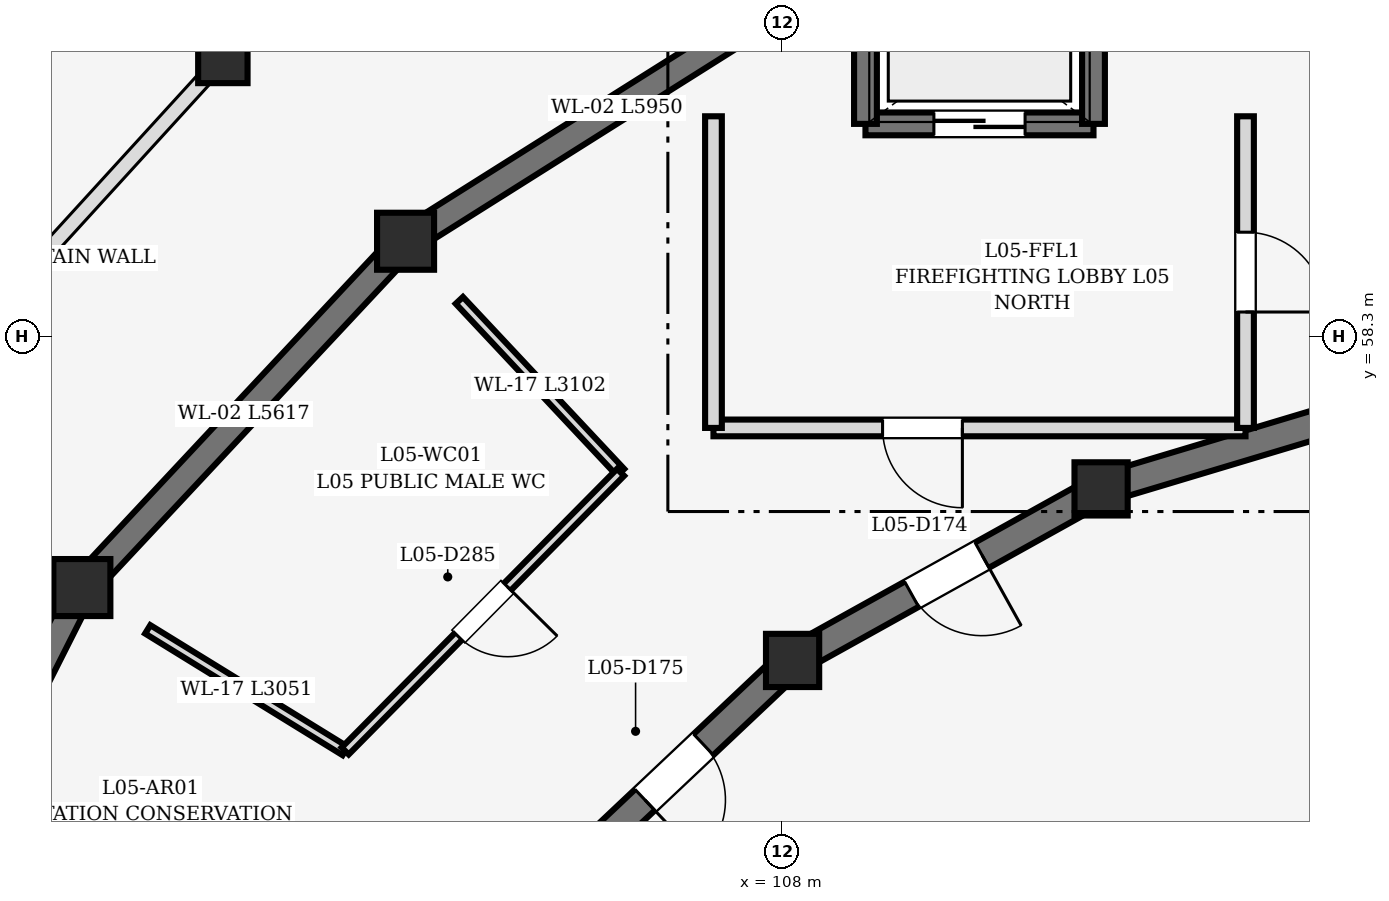
"""IFC4 building model, lengths in metres.
Left out: names, types, materials, properties, quantities, classifications, styles, units other than length and angle.
Written with IfcOpenShell. Run it as: python <this file> out.ifc"""

import sys

from ifc_helpers import new_model, si_unit, direction, frame, frame_2d, origin, origin_2d, place, context, subcontext, project, spatial, rectangle, circle, extrude, element, fill, save


model = new_model("IFC4")
c1 = context("Model", 3, precision=1e-05, world=origin(), true_north=direction((0.0, 1.0)))
c2 = subcontext(c1, "Body", "Model", "MODEL_VIEW")
j1 = project(units=[si_unit("LENGTHUNIT", "METRE"), si_unit("PLANEANGLEUNIT", "RADIAN")], contexts=[c1])
p1 = place(None, origin())
s1 = spatial("IfcSite", under=j1, at=p1, CompositionType="ELEMENT")
p2 = place(p1, origin())
s2 = spatial("IfcBuilding", under=s1, at=p2, CompositionType="ELEMENT")
p3 = place(p2, frame((0.0, 0.0, 19.2)))
s3 = spatial("IfcBuildingStorey", under=s2, at=p3, CompositionType="ELEMENT", Elevation=19.2)
for number, where, z_axis, x_axis in (
    (1, (112.2, 56.298, 0.0), (0.0, 0.0, 1.0), (1.0, 0.0, 0.0)),
    (2, (108.141, 54.041, 0.0), (0.0, 0.0, 1.0), (1.0, 0.0, 0.0)),
):
    element("IfcColumn", number, at=place(p3, frame(where, z_axis=z_axis, x_axis=x_axis)), inside=s3, PredefinedType="COLUMN", context=c2, shape_type="SweptSolid", body=[
        extrude(rectangle(XDim=0.7, YDim=0.7, at=origin_2d()), origin(), (0.0, 0.0, 1.0), 4.5),
    ])
p4 = place(p3, frame((103.049, 59.556, 0.0), z_axis=(0.0, 0.0, 1.0), x_axis=(1.0, 0.0, 0.0)))
e3 = element("IfcColumn", 3, at=p4, inside=s3, PredefinedType="COLUMN", context=c2, shape_type="SweptSolid", body=[
    extrude(circle(Radius=0.375, at=origin_2d()), origin(), (0.0, 0.0, 1.0), 4.5),
])
p5 = place(p3, frame((100.645, 61.961, 0.0), z_axis=(0.0, 0.0, 1.0), x_axis=(1.0, 0.0, 0.0)))
e4 = element("IfcColumn", 4, at=p5, inside=s3, PredefinedType="COLUMN", context=c2, shape_type="SweptSolid", body=[
    extrude(circle(Radius=0.325, at=origin_2d()), origin(), (0.0, 0.0, 1.0), 4.5),
])
p6 = place(p3, frame((98.79, 55.0, 0.0), z_axis=(0.0, 0.0, 1.0), x_axis=(1.0, 0.0, 0.0)))
e5 = element("IfcColumn", 5, at=p6, inside=s3, PredefinedType="COLUMN", context=c2, shape_type="SweptSolid", body=[
    extrude(circle(Radius=0.375, at=origin_2d()), origin(), (0.0, 0.0, 1.0), 4.5),
])
p7 = place(p3, frame((116.654, 57.634, 0.0), z_axis=(0.0, 0.0, 1.0), x_axis=(-0.957792414988, -0.287460762177, 0.0)))
e6 = element("IfcWall", 6, at=p7, inside=s3, PredefinedType="SOLIDWALL", context=c2, shape_type="SweptSolid", body=[
    extrude(rectangle(XDim=4.365, YDim=0.38, at=frame_2d((2.183, 0.0))), origin(), (0.0, 0.0, 1.0), 4.25),
])
p8 = place(p3, frame((111.951, 56.159, 0.0), z_axis=(0.0, 0.0, 1.0), x_axis=(-0.87401308715, -0.485902380618, 0.0)))
e7 = element("IfcWall", 7, at=p8, inside=s3, PredefinedType="SOLIDWALL", context=c2, shape_type="SweptSolid", body=[
    extrude(rectangle(XDim=4.074, YDim=0.38, at=frame_2d((2.037, 0.0))), origin(), (0.0, 0.0, 1.0), 4.25),
])
p9 = place(p8, frame((1.507, 0.0, 0.0)))
e8 = element("IfcOpeningElement", 8, at=p9, cuts=e7, PredefinedType="OPENING", context=c2, shape_type="SweptSolid", body=[
    extrude(rectangle(XDim=1.06, YDim=2.24, at=frame_2d((0.53, 1.12))), frame((0.0, 0.202, 0.0), z_axis=(0.0, -1.0, 0.0), x_axis=(1.0, 0.0, 0.0)), (0.0, 0.0, 1.0), 0.404),
])
p10 = place(p3, frame((108.346, 62.893, 0.0), z_axis=(0.0, 0.0, 1.0), x_axis=(-0.846132783073, -0.532972150688, 0.0)))
e9 = element("IfcWall", 9, at=p10, inside=s3, PredefinedType="SHEAR", context=c2, shape_type="SweptSolid", body=[
    extrude(rectangle(XDim=5.95, YDim=0.35, at=frame_2d((2.975, 0.0))), origin(), (0.0, 0.0, 1.0), 4.23),
])
p11 = place(p3, frame((107.934, 53.845, 0.0), z_axis=(0.0, 0.0, 1.0), x_axis=(-0.727127996206, -0.686501913423, 0.0)))
e10 = element("IfcWall", 10, at=p11, inside=s3, PredefinedType="SOLIDWALL", context=c2, shape_type="SweptSolid", body=[
    extrude(rectangle(XDim=3.714, YDim=0.38, at=frame_2d((1.857, 0.0))), origin(), (0.0, 0.0, 1.0), 4.25),
])
p12 = place(p11, frame((1.327, 0.0, 0.0)))
e11 = element("IfcOpeningElement", 11, at=p12, cuts=e10, PredefinedType="OPENING", context=c2, shape_type="SweptSolid", body=[
    extrude(rectangle(XDim=1.06, YDim=2.24, at=frame_2d((0.53, 1.12))), frame((0.0, 0.202, 0.0), z_axis=(0.0, -1.0, 0.0), x_axis=(1.0, 0.0, 0.0)), (0.0, 0.0, 1.0), 0.404),
])
p13 = place(p3, frame((102.838, 59.33, 0.0), z_axis=(0.0, 0.0, 1.0), x_axis=(-0.682886399388, -0.730524582427, 0.0)))
e12 = element("IfcWall", 12, at=p13, inside=s3, PredefinedType="SHEAR", context=c2, shape_type="SweptSolid", body=[
    extrude(rectangle(XDim=5.617, YDim=0.35, at=frame_2d((2.809, 0.0))), origin(), (0.0, 0.0, 1.0), 4.23),
])
p14 = place(p3, frame((98.651, 54.723, 0.0), z_axis=(0.0, 0.0, 1.0), x_axis=(-0.450512686904, -0.892770025784, 0.0)))
e13 = element("IfcWall", 13, at=p14, inside=s3, PredefinedType="SHEAR", context=c2, shape_type="SweptSolid", body=[
    extrude(rectangle(XDim=5.323, YDim=0.35, at=frame_2d((2.662, 0.0))), origin(), (0.0, 0.0, 1.0), 4.23),
])
p15 = place(p3, frame((112.1, 61.1, 0.0), z_axis=(0.0, 0.0, 1.0), x_axis=(-1.0, 0.0, 0.0)))
e14 = element("IfcWall", 14, at=p15, inside=s3, PredefinedType="SHEAR", context=c2, shape_type="SweptSolid", body=[
    extrude(rectangle(XDim=3.0, YDim=0.3, at=frame_2d((1.5, 0.0))), origin(), (0.0, 0.0, 1.0), 4.28),
])
p16 = place(p15, frame((0.9, 0.0, 0.0)))
e15 = element("IfcOpeningElement", 15, at=p16, cuts=e14, PredefinedType="OPENING", context=c2, shape_type="SweptSolid", body=[
    extrude(rectangle(XDim=1.2, YDim=2.15, at=frame_2d((0.6, 1.075))), frame((0.0, 0.162, 0.0), z_axis=(0.0, -1.0, 0.0), x_axis=(1.0, 0.0, 0.0)), (0.0, 0.0, 1.0), 0.324),
])
p17 = place(p3, frame((112.1, 63.3, 0.0), z_axis=(0.0, 0.0, 1.0), x_axis=(0.0, -1.0, 0.0)))
e16 = element("IfcWall", 16, at=p17, inside=s3, PredefinedType="SHEAR", context=c2, shape_type="SweptSolid", body=[
    extrude(rectangle(XDim=2.2, YDim=0.3, at=frame_2d((1.1, 0.0))), origin(), (0.0, 0.0, 1.0), 4.28),
])
p18 = place(p3, frame((109.1, 61.1, 0.0), z_axis=(0.0, 0.0, 1.0), x_axis=(0.0, 1.0, 0.0)))
e17 = element("IfcWall", 17, at=p18, inside=s3, PredefinedType="SHEAR", context=c2, shape_type="SweptSolid", body=[
    extrude(rectangle(XDim=2.2, YDim=0.3, at=frame_2d((1.1, 0.0))), origin(), (0.0, 0.0, 1.0), 4.23),
])
p19 = place(p3, frame((114.1, 57.1, 0.0), z_axis=(0.0, 0.0, 1.0), x_axis=(-1.0, 0.0, 0.0)))
e18 = element("IfcWall", 18, at=p19, inside=s3, PredefinedType="SOLIDWALL", context=c2, shape_type="SweptSolid", body=[
    extrude(rectangle(XDim=7.0, YDim=0.22, at=frame_2d((3.5, 0.0))), origin(), (0.0, 0.0, 1.0), 4.265),
])
p20 = place(p19, frame((3.725, 0.0, 0.0)))
e19 = element("IfcOpeningElement", 19, at=p20, cuts=e18, PredefinedType="OPENING", context=c2, shape_type="SweptSolid", body=[
    extrude(rectangle(XDim=1.05, YDim=2.15, at=frame_2d((0.525, 1.075))), frame((0.0, 0.122, 0.0), z_axis=(0.0, -1.0, 0.0), x_axis=(1.0, 0.0, 0.0)), (0.0, 0.0, 1.0), 0.244),
])
p21 = place(p3, frame((107.1, 57.1, 0.0), z_axis=(0.0, 0.0, 1.0), x_axis=(0.0, 1.0, 0.0)))
e20 = element("IfcWall", 20, at=p21, inside=s3, PredefinedType="SOLIDWALL", context=c2, shape_type="SweptSolid", body=[
    extrude(rectangle(XDim=4.1, YDim=0.22, at=frame_2d((2.05, 0.0))), origin(), (0.0, 0.0, 1.0), 4.265),
])
p22 = place(p3, frame((114.1, 61.2, 0.0), z_axis=(0.0, 0.0, 1.0), x_axis=(0.0, -1.0, 0.0)))
e21 = element("IfcWall", 21, at=p22, inside=s3, PredefinedType="SOLIDWALL", context=c2, shape_type="SweptSolid", body=[
    extrude(rectangle(XDim=4.1, YDim=0.22, at=frame_2d((2.05, 0.0))), origin(), (0.0, 0.0, 1.0), 4.265),
])
p23 = place(p22, frame((1.525, 0.0, 0.0)))
e22 = element("IfcOpeningElement", 22, at=p23, cuts=e21, PredefinedType="OPENING", context=c2, shape_type="SweptSolid", body=[
    extrude(rectangle(XDim=1.05, YDim=2.15, at=frame_2d((0.525, 1.075))), frame((0.0, 0.122, 0.0), z_axis=(0.0, -1.0, 0.0), x_axis=(1.0, 0.0, 0.0)), (0.0, 0.0, 1.0), 0.244),
])
p24 = place(p3, frame((105.878, 56.516, 0.0), z_axis=(0.0, 0.0, 1.0), x_axis=(-0.683951602278, 0.72952738519, 0.0)))
e23 = element("IfcWall", 23, at=p24, inside=s3, PredefinedType="PARTITIONING", context=c2, shape_type="SweptSolid", body=[
    extrude(rectangle(XDim=3.102, YDim=0.13, at=frame_2d((1.551, 0.0))), origin(), (0.0, 0.0, 1.0), 3.734),
])
p25 = place(p3, frame((102.255, 52.85, 0.0), z_axis=(0.0, 0.0, 1.0), x_axis=(-0.85151267833, 0.524334014386, 0.0)))
e24 = element("IfcWall", 24, at=p25, inside=s3, PredefinedType="PARTITIONING", context=c2, shape_type="SweptSolid", body=[
    extrude(rectangle(XDim=3.051, YDim=0.13, at=frame_2d((1.526, 0.0))), origin(), (0.0, 0.0, 1.0), 3.734),
])
p26 = place(p3, frame((105.878, 56.516, 0.0), z_axis=(0.0, 0.0, 1.0), x_axis=(-0.702973842803, -0.711215703099, 0.0)))
e25 = element("IfcWall", 25, at=p26, inside=s3, PredefinedType="PARTITIONING", context=c2, shape_type="SweptSolid", body=[
    extrude(rectangle(XDim=5.154, YDim=0.13, at=frame_2d((2.577, 0.0))), origin(), (0.0, 0.0, 1.0), 4.265),
])
p27 = place(p26, frame((2.117, 0.0, 0.0)))
e26 = element("IfcOpeningElement", 26, at=p27, cuts=e25, PredefinedType="OPENING", context=c2, shape_type="SweptSolid", body=[
    extrude(rectangle(XDim=0.92, YDim=2.1, at=frame_2d((0.46, 1.05))), frame((0.0, 0.077, 0.0), z_axis=(0.0, -1.0, 0.0), x_axis=(1.0, 0.0, 0.0)), (0.0, 0.0, 1.0), 0.154),
])
p28 = place(p16, origin())
e27 = element("IfcDoor", 27, at=p28, inside=s3, OperationType="DOUBLE_DOOR_SLIDING", PredefinedType="DOOR", context=c2, shape_type="SweptSolid", body=[
    extrude(rectangle(XDim=1.2, YDim=2.15, at=frame_2d((0.6, 1.075))), frame((0.0, 0.025, 0.0), z_axis=(0.0, -1.0, 0.0), x_axis=(1.0, 0.0, 0.0)), (0.0, 0.0, 1.0), 0.05),
])
fill(e15, e27)
p29 = place(p20, origin())
e28 = element("IfcDoor", 28, at=p29, inside=s3, OperationType="SINGLE_SWING_LEFT", PredefinedType="DOOR", context=c2, shape_type="SweptSolid", body=[
    extrude(rectangle(XDim=1.05, YDim=2.15, at=frame_2d((0.525, 1.075))), frame((0.0, 0.025, 0.0), z_axis=(0.0, -1.0, 0.0), x_axis=(1.0, 0.0, 0.0)), (0.0, 0.0, 1.0), 0.05),
])
fill(e19, e28)
p30 = place(p23, origin())
e29 = element("IfcDoor", 29, at=p30, inside=s3, OperationType="SINGLE_SWING_RIGHT", PredefinedType="DOOR", context=c2, shape_type="SweptSolid", body=[
    extrude(rectangle(XDim=1.05, YDim=2.15, at=frame_2d((0.525, 1.075))), frame((0.0, 0.025, 0.0), z_axis=(0.0, -1.0, 0.0), x_axis=(1.0, 0.0, 0.0)), (0.0, 0.0, 1.0), 0.05),
])
fill(e22, e29)
p31 = place(p9, origin())
e30 = element("IfcDoor", 30, at=p31, inside=s3, OperationType="SINGLE_SWING_LEFT", PredefinedType="DOOR", context=c2, shape_type="SweptSolid", body=[
    extrude(rectangle(XDim=1.06, YDim=2.24, at=frame_2d((0.53, 1.12))), frame((0.0, 0.025, 0.0), z_axis=(0.0, -1.0, 0.0), x_axis=(1.0, 0.0, 0.0)), (0.0, 0.0, 1.0), 0.05),
])
fill(e8, e30)
p32 = place(p12, origin())
e31 = element("IfcDoor", 31, at=p32, inside=s3, OperationType="SINGLE_SWING_RIGHT", PredefinedType="DOOR", context=c2, shape_type="SweptSolid", body=[
    extrude(rectangle(XDim=1.06, YDim=2.24, at=frame_2d((0.53, 1.12))), frame((0.0, 0.025, 0.0), z_axis=(0.0, -1.0, 0.0), x_axis=(1.0, 0.0, 0.0)), (0.0, 0.0, 1.0), 0.05),
])
fill(e11, e31)
p33 = place(p27, origin())
e32 = element("IfcDoor", 32, at=p33, inside=s3, OperationType="SINGLE_SWING_LEFT", PredefinedType="DOOR", context=c2, shape_type="SweptSolid", body=[
    extrude(rectangle(XDim=0.92, YDim=2.1, at=frame_2d((0.46, 1.05))), frame((0.0, 0.025, 0.0), z_axis=(0.0, -1.0, 0.0), x_axis=(1.0, 0.0, 0.0)), (0.0, 0.0, 1.0), 0.05),
])
fill(e26, e32)
save(model, sys.argv[1])
